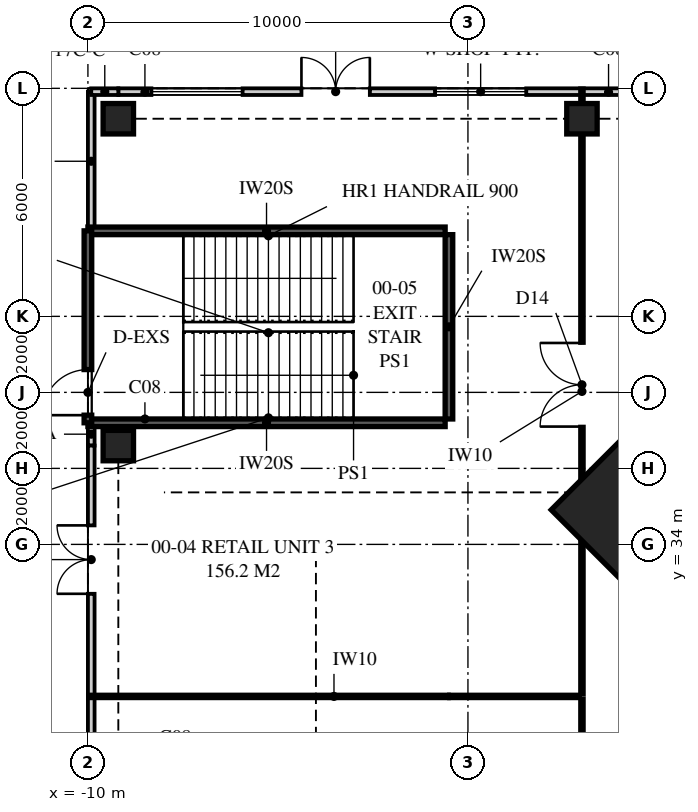
"""IFC4 building model, lengths in metres.
Left out: names, types, materials, properties, quantities, classifications, styles, units other than length and angle.
Written with IfcOpenShell. Run it as: python <this file> out.ifc"""

import sys

from ifc_helpers import new_model, si_unit, direction, frame, frame_2d, origin, origin_2d, place, context, subcontext, project, spatial, polyline, rectangle, outline, extrude, element, fill, save


model = new_model("IFC4")
c1 = context("Model", 3, precision=1e-05, world=origin(), true_north=direction((0.0, 1.0)))
c2 = subcontext(c1, "Body", "Model", "MODEL_VIEW")
j1 = project(units=[si_unit("LENGTHUNIT", "METRE"), si_unit("PLANEANGLEUNIT", "RADIAN")], contexts=[c1])
p1 = place(None, origin())
s1 = spatial("IfcSite", under=j1, at=p1, CompositionType="ELEMENT")
p2 = place(p1, origin())
s2 = spatial("IfcBuilding", under=s1, at=p2, CompositionType="ELEMENT")
p3 = place(p2, origin())
s3 = spatial("IfcBuildingStorey", under=s2, at=p3, CompositionType="ELEMENT", Elevation=0.0)
p4 = place(p3, frame((4.631, 35.369, 0.0), z_axis=(0.0, 0.0, 1.0), x_axis=(0.707106781187, -0.707106781187, 0.0)))
e1 = element("IfcColumn", 1, at=p4, inside=s3, PredefinedType="COLUMN", context=c2, shape_type="SweptSolid", body=[
    extrude(rectangle(XDim=2.8, YDim=4.1, at=origin_2d()), origin(), (0.0, 0.0, 1.0), 6.0),
])
for number, where, z_axis, x_axis in (
    (2, (-9.2, 36.6, 0.0), (0.0, 0.0, 1.0), (1.0, 0.0, 0.0)),
    (3, (-9.2, 45.2, 0.0), (0.0, 0.0, 1.0), (1.0, 0.0, 0.0)),
    (4, (3.0, 45.2, 0.0), (0.0, 0.0, 1.0), (1.0, 0.0, 0.0)),
):
    element("IfcColumn", number, at=place(p3, frame(where, z_axis=z_axis, x_axis=x_axis)), inside=s3, PredefinedType="COLUMN", context=c2, shape_type="SweptSolid", body=[
        extrude(rectangle(XDim=0.8, YDim=0.8, at=origin_2d()), origin(), (0.0, 0.0, 1.0), 6.0),
    ])
p5 = place(p3, frame((59.2, 45.913, 0.0), z_axis=(0.0, 0.0, 1.0), x_axis=(-1.0, 0.0, 0.0)))
e5 = element("IfcWall", 5, at=p5, inside=s3, PredefinedType="SOLIDWALL", context=c2, shape_type="SweptSolid", body=[
    extrude(rectangle(XDim=68.4, YDim=0.175, at=frame_2d((34.2, 0.0))), origin(), (0.0, 0.0, 1.0), 5.12),
])
p6 = place(p5, frame((0.6, 0.0, 0.0)))
e6 = element("IfcOpeningElement", 6, at=p6, cuts=e5, PredefinedType="OPENING", context=c2, shape_type="SweptSolid", body=[
    extrude(rectangle(XDim=3.6, YDim=4.8, at=frame_2d((1.8, 2.4))), frame((0.0, 0.097, 0.0), z_axis=(0.0, -1.0, 0.0), x_axis=(1.0, 0.0, 0.0)), (0.0, 0.0, 1.0), 0.195),
])
p7 = place(p5, frame((7.1, 0.0, 0.0)))
e7 = element("IfcOpeningElement", 7, at=p7, cuts=e5, PredefinedType="OPENING", context=c2, shape_type="SweptSolid", body=[
    extrude(rectangle(XDim=4.0, YDim=3.0, at=frame_2d((2.0, 1.5))), frame((0.0, 0.097, 0.0), z_axis=(0.0, -1.0, 0.0), x_axis=(1.0, 0.0, 0.0)), (0.0, 0.0, 1.0), 0.195),
])
p8 = place(p5, frame((30.9, 0.0, 0.0)))
e8 = element("IfcOpeningElement", 8, at=p8, cuts=e5, PredefinedType="OPENING", context=c2, shape_type="SweptSolid", body=[
    extrude(rectangle(XDim=4.0, YDim=4.5, at=frame_2d((2.0, 2.25))), frame((0.0, 0.097, 0.0), z_axis=(0.0, -1.0, 0.0), x_axis=(1.0, 0.0, 0.0)), (0.0, 0.0, 1.0), 0.195),
])
p9 = place(p5, frame((17.0, 0.0, 0.0)))
e9 = element("IfcOpeningElement", 9, at=p9, cuts=e5, PredefinedType="OPENING", context=c2, shape_type="SweptSolid", body=[
    extrude(rectangle(XDim=4.0, YDim=4.5, at=frame_2d((2.0, 2.25))), frame((0.0, 0.097, 0.0), z_axis=(0.0, -1.0, 0.0), x_axis=(1.0, 0.0, 0.0)), (0.0, 0.0, 1.0), 0.195),
])
p10 = place(p5, frame((36.45, 0.0, 0.0)))
e10 = element("IfcOpeningElement", 10, at=p10, cuts=e5, PredefinedType="OPENING", context=c2, shape_type="SweptSolid", body=[
    extrude(rectangle(XDim=1.0, YDim=2.2, at=frame_2d((0.5, 1.1))), frame((0.0, 0.097, 0.0), z_axis=(0.0, -1.0, 0.0), x_axis=(1.0, 0.0, 0.0)), (0.0, 0.0, 1.0), 0.195),
])
p11 = place(p5, frame((51.95, 0.0, 0.0)))
e11 = element("IfcOpeningElement", 11, at=p11, cuts=e5, PredefinedType="OPENING", context=c2, shape_type="SweptSolid", body=[
    extrude(rectangle(XDim=2.0, YDim=2.7, at=frame_2d((1.0, 1.35))), frame((0.0, 0.097, 0.0), z_axis=(0.0, -1.0, 0.0), x_axis=(1.0, 0.0, 0.0)), (0.0, 0.0, 1.0), 0.195),
])
p12 = place(p5, frame((61.781, 0.0, 0.0)))
e12 = element("IfcOpeningElement", 12, at=p12, cuts=e5, PredefinedType="OPENING", context=c2, shape_type="SweptSolid", body=[
    extrude(rectangle(XDim=1.8, YDim=2.7, at=frame_2d((0.9, 1.35))), frame((0.0, 0.097, 0.0), z_axis=(0.0, -1.0, 0.0), x_axis=(1.0, 0.0, 0.0)), (0.0, 0.0, 1.0), 0.195),
])
p13 = place(p5, frame((57.666, 0.0, 0.3)))
e13 = element("IfcOpeningElement", 13, at=p13, cuts=e5, PredefinedType="OPENING", context=c2, shape_type="SweptSolid", body=[
    extrude(rectangle(XDim=2.4, YDim=3.0, at=frame_2d((1.2, 1.5))), frame((0.0, 0.097, 0.0), z_axis=(0.0, -1.0, 0.0), x_axis=(1.0, 0.0, 0.0)), (0.0, 0.0, 1.0), 0.195),
])
p14 = place(p5, frame((65.129, 0.0, 0.3)))
e14 = element("IfcOpeningElement", 14, at=p14, cuts=e5, PredefinedType="OPENING", context=c2, shape_type="SweptSolid", body=[
    extrude(rectangle(XDim=2.4, YDim=3.0, at=frame_2d((1.2, 1.5))), frame((0.0, 0.097, 0.0), z_axis=(0.0, -1.0, 0.0), x_axis=(1.0, 0.0, 0.0)), (0.0, 0.0, 1.0), 0.195),
])
p15 = place(p3, frame((-9.2, 45.913, 0.0), z_axis=(0.0, 0.0, 1.0), x_axis=(-1.0, 0.0, 0.0)))
e15 = element("IfcWall", 15, at=p15, inside=s3, PredefinedType="SOLIDWALL", context=c2, shape_type="SweptSolid", body=[
    extrude(rectangle(XDim=0.713, YDim=0.175, at=frame_2d((0.356, 0.0))), origin(), (0.0, 0.0, 1.0), 5.72),
])
p16 = place(p3, frame((-10.0, 42.25, 0.0), z_axis=(0.0, 0.0, 1.0), x_axis=(0.0, -1.0, 0.0)))
e16 = element("IfcWall", 16, at=p16, inside=s3, PredefinedType="SOLIDWALL", context=c2, shape_type="SweptSolid", body=[
    extrude(rectangle(XDim=5.05, YDim=0.2, at=frame_2d((2.525, 0.0))), origin(), (0.0, 0.0, 1.0), 6.0),
])
p17 = place(p16, frame((3.65, 0.0, 0.0)))
e17 = element("IfcOpeningElement", 17, at=p17, cuts=e16, PredefinedType="OPENING", context=c2, shape_type="SweptSolid", body=[
    extrude(rectangle(XDim=1.2, YDim=2.1, at=frame_2d((0.6, 1.05))), frame((0.0, 0.11, 0.0), z_axis=(0.0, -1.0, 0.0), x_axis=(1.0, 0.0, 0.0)), (0.0, 0.0, 1.0), 0.22),
])
p18 = place(p3, frame((-9.913, 45.913, 0.0), z_axis=(0.0, 0.0, 1.0), x_axis=(0.0, -1.0, 0.0)))
e18 = element("IfcWall", 18, at=p18, inside=s3, PredefinedType="SOLIDWALL", context=c2, shape_type="SweptSolid", body=[
    extrude(rectangle(XDim=3.663, YDim=0.175, at=frame_2d((1.831, 0.0))), origin(), (0.0, 0.0, 1.0), 5.72),
])
p19 = place(p3, frame((-9.913, 37.2, 0.0), z_axis=(0.0, 0.0, 1.0), x_axis=(0.0, -1.0, 0.0)))
e19 = element("IfcWall", 19, at=p19, inside=s3, PredefinedType="SOLIDWALL", context=c2, shape_type="SweptSolid", body=[
    extrude(rectangle(XDim=0.6, YDim=0.175, at=frame_2d((0.3, 0.0))), origin(), (0.0, 0.0, 1.0), 5.72),
])
p20 = place(p3, frame((-9.913, 36.6, 0.0), z_axis=(0.0, 0.0, 1.0), x_axis=(0.0, -1.0, 0.0)))
e20 = element("IfcWall", 20, at=p20, inside=s3, PredefinedType="SOLIDWALL", context=c2, shape_type="SweptSolid", body=[
    extrude(rectangle(XDim=41.8, YDim=0.175, at=frame_2d((20.9, 0.0))), origin(), (0.0, 0.0, 1.0), 5.12),
])
p21 = place(p20, frame((2.1, 0.0, 0.0)))
e21 = element("IfcOpeningElement", 21, at=p21, cuts=e20, PredefinedType="OPENING", context=c2, shape_type="SweptSolid", body=[
    extrude(rectangle(XDim=1.8, YDim=2.7, at=frame_2d((0.9, 1.35))), frame((0.0, 0.097, 0.0), z_axis=(0.0, -1.0, 0.0), x_axis=(1.0, 0.0, 0.0)), (0.0, 0.0, 1.0), 0.195),
])
p22 = place(p20, frame((13.7, 0.0, 0.0)))
e22 = element("IfcOpeningElement", 22, at=p22, cuts=e20, PredefinedType="OPENING", context=c2, shape_type="SweptSolid", body=[
    extrude(rectangle(XDim=1.8, YDim=2.7, at=frame_2d((0.9, 1.35))), frame((0.0, 0.097, 0.0), z_axis=(0.0, -1.0, 0.0), x_axis=(1.0, 0.0, 0.0)), (0.0, 0.0, 1.0), 0.195),
])
p23 = place(p20, frame((9.294, 0.0, 0.3)))
e23 = element("IfcOpeningElement", 23, at=p23, cuts=e20, PredefinedType="OPENING", context=c2, shape_type="SweptSolid", body=[
    extrude(rectangle(XDim=2.4, YDim=3.0, at=frame_2d((1.2, 1.5))), frame((0.0, 0.097, 0.0), z_axis=(0.0, -1.0, 0.0), x_axis=(1.0, 0.0, 0.0)), (0.0, 0.0, 1.0), 0.195),
])
p24 = place(p20, frame((17.975, 0.0, 0.3)))
e24 = element("IfcOpeningElement", 24, at=p24, cuts=e20, PredefinedType="OPENING", context=c2, shape_type="SweptSolid", body=[
    extrude(rectangle(XDim=2.4, YDim=3.0, at=frame_2d((1.2, 1.5))), frame((0.0, 0.097, 0.0), z_axis=(0.0, -1.0, 0.0), x_axis=(1.0, 0.0, 0.0)), (0.0, 0.0, 1.0), 0.195),
])
p25 = place(p20, frame((26.716, 0.0, 0.0)))
e25 = element("IfcOpeningElement", 25, at=p25, cuts=e20, PredefinedType="OPENING", context=c2, shape_type="SweptSolid", body=[
    extrude(rectangle(XDim=1.8, YDim=2.7, at=frame_2d((0.9, 1.35))), frame((0.0, 0.097, 0.0), z_axis=(0.0, -1.0, 0.0), x_axis=(1.0, 0.0, 0.0)), (0.0, 0.0, 1.0), 0.195),
])
p26 = place(p20, frame((36.647, 0.0, 0.0)))
e26 = element("IfcOpeningElement", 26, at=p26, cuts=e20, PredefinedType="OPENING", context=c2, shape_type="SweptSolid", body=[
    extrude(rectangle(XDim=1.8, YDim=2.7, at=frame_2d((0.9, 1.35))), frame((0.0, 0.097, 0.0), z_axis=(0.0, -1.0, 0.0), x_axis=(1.0, 0.0, 0.0)), (0.0, 0.0, 1.0), 0.195),
])
p27 = place(p3, frame((3.0, 25.0, 0.0), z_axis=(0.0, 0.0, 1.0), x_axis=(0.0, 1.0, 0.0)))
e27 = element("IfcWall", 27, at=p27, inside=s3, PredefinedType="PARTITIONING", context=c2, shape_type="SweptSolid", body=[
    extrude(outline(polyline([(0.0, 0.0), (4.95, 0.0), (4.95, 5.72), (1.26, 5.72), (1.26, 5.12), (0.0, 5.12), (0.0, 0.0)])), frame((0.0, 0.05, 0.0), z_axis=(0.0, -1.0, 0.0), x_axis=(1.0, 0.0, 0.0)), (0.0, 0.0, 1.0), 0.1),
])
p28 = place(p3, frame((3.0, 30.05, 0.0), z_axis=(0.0, 0.0, 1.0), x_axis=(0.0, 1.0, 0.0)))
e28 = element("IfcWall", 28, at=p28, inside=s3, PredefinedType="PARTITIONING", context=c2, shape_type="SweptSolid", body=[
    extrude(outline(polyline([(0.0, 0.0), (15.95, 0.0), (15.95, 5.72), (15.95, 5.12), (13.89, 5.12), (13.89, 5.72), (6.579, 5.72), (6.579, 5.12), (4.059, 5.12), (4.059, 5.72), (0.0, 5.72), (0.0, 0.0)])), frame((0.0, 0.05, 0.0), z_axis=(0.0, -1.0, 0.0), x_axis=(1.0, 0.0, 0.0)), (0.0, 0.0, 1.0), 0.1),
])
p29 = place(p28, frame((7.05, 0.0, 0.0)))
e29 = element("IfcOpeningElement", 29, at=p29, cuts=e28, PredefinedType="OPENING", context=c2, shape_type="SweptSolid", body=[
    extrude(rectangle(XDim=2.2, YDim=2.7, at=frame_2d((1.1, 1.35))), frame((0.0, 0.06, 0.0), z_axis=(0.0, -1.0, 0.0), x_axis=(1.0, 0.0, 0.0)), (0.0, 0.0, 1.0), 0.12),
])
p30 = place(p3, frame((-0.5, 30.0, 0.0), z_axis=(0.0, 0.0, 1.0), x_axis=(1.0, 0.0, 0.0)))
e30 = element("IfcWall", 30, at=p30, inside=s3, PredefinedType="PARTITIONING", context=c2, shape_type="SweptSolid", body=[
    extrude(rectangle(XDim=3.45, YDim=0.1, at=frame_2d((1.725, 0.0))), origin(), (0.0, 0.0, 1.0), 5.72),
])
p31 = place(p3, frame((-10.0, 30.0, 0.0), z_axis=(0.0, 0.0, 1.0), x_axis=(1.0, 0.0, 0.0)))
e31 = element("IfcWall", 31, at=p31, inside=s3, PredefinedType="PARTITIONING", context=c2, shape_type="SweptSolid", body=[
    extrude(outline(polyline([(0.0, 0.0), (9.5, 0.0), (9.5, 5.72), (7.26, 5.72), (7.26, 5.12), (4.74, 5.12), (4.74, 5.72), (2.06, 5.72), (2.06, 5.12), (0.0, 5.12), (0.0, 5.72), (0.0, 0.0)])), frame((0.0, 0.05, 0.0), z_axis=(0.0, -1.0, 0.0), x_axis=(1.0, 0.0, 0.0)), (0.0, 0.0, 1.0), 0.1),
])
p32 = place(p3, frame((-0.5, 37.3, 0.0), z_axis=(0.0, 0.0, 1.0), x_axis=(0.0, 1.0, 0.0)))
e32 = element("IfcWall", 32, at=p32, inside=s3, PredefinedType="SOLIDWALL", context=c2, shape_type="SweptSolid", body=[
    extrude(rectangle(XDim=4.85, YDim=0.2, at=frame_2d((2.425, 0.0))), origin(), (0.0, 0.0, 1.0), 6.0),
])
for number, where, z_axis, x_axis in (
    (33, (-10.0, 37.2, 0.0), (0.0, 0.0, 1.0), (1.0, 0.0, 0.0)),
    (34, (-10.0, 42.25, 0.0), (0.0, 0.0, 1.0), (1.0, 0.0, 0.0)),
):
    element("IfcWall", number, at=place(p3, frame(where, z_axis=z_axis, x_axis=x_axis)), inside=s3, PredefinedType="SOLIDWALL", context=c2, shape_type="SweptSolid", body=[
        extrude(rectangle(XDim=9.4, YDim=0.2, at=frame_2d((4.7, 0.0))), origin(), (0.0, 0.0, 1.0), 6.0),
    ])
p33 = place(p12, frame((1.8, 0.0, 0.0), z_axis=(0.0, 0.0, 1.0), x_axis=(-1.0, 0.0, 0.0)))
e35 = element("IfcDoor", 35, at=p33, inside=s3, OperationType="DOUBLE_DOOR_SINGLE_SWING", PredefinedType="DOOR", context=c2, shape_type="SweptSolid", body=[
    extrude(rectangle(XDim=1.8, YDim=2.7, at=frame_2d((0.9, 1.35))), frame((0.0, 0.025, 0.0), z_axis=(0.0, -1.0, 0.0), x_axis=(1.0, 0.0, 0.0)), (0.0, 0.0, 1.0), 0.05),
])
fill(e12, e35)
p34 = place(p13, origin())
e36 = element("IfcWindow", 36, at=p34, inside=s3, PartitioningType="SINGLE_PANEL", PredefinedType="WINDOW", context=c2, shape_type="SweptSolid", body=[
    extrude(rectangle(XDim=2.4, YDim=3.0, at=frame_2d((1.2, 1.5))), frame((0.0, 0.03, 0.0), z_axis=(0.0, -1.0, 0.0), x_axis=(1.0, 0.0, 0.0)), (0.0, 0.0, 1.0), 0.06),
])
fill(e13, e36)
p35 = place(p14, origin())
e37 = element("IfcWindow", 37, at=p35, inside=s3, PartitioningType="SINGLE_PANEL", PredefinedType="WINDOW", context=c2, shape_type="SweptSolid", body=[
    extrude(rectangle(XDim=2.4, YDim=3.0, at=frame_2d((1.2, 1.5))), frame((0.0, 0.03, 0.0), z_axis=(0.0, -1.0, 0.0), x_axis=(1.0, 0.0, 0.0)), (0.0, 0.0, 1.0), 0.06),
])
fill(e14, e37)
p36 = place(p17, frame((1.2, 0.0, 0.0), z_axis=(0.0, 0.0, 1.0), x_axis=(-1.0, 0.0, 0.0)))
e38 = element("IfcDoor", 38, at=p36, inside=s3, OperationType="SINGLE_SWING_LEFT", PredefinedType="DOOR", context=c2, shape_type="SweptSolid", body=[
    extrude(rectangle(XDim=1.2, YDim=2.1, at=frame_2d((0.6, 1.05))), frame((0.0, 0.025, 0.0), z_axis=(0.0, -1.0, 0.0), x_axis=(1.0, 0.0, 0.0)), (0.0, 0.0, 1.0), 0.05),
])
fill(e17, e38)
p37 = place(p21, frame((1.8, 0.0, 0.0), z_axis=(0.0, 0.0, 1.0), x_axis=(-1.0, 0.0, 0.0)))
e39 = element("IfcDoor", 39, at=p37, inside=s3, OperationType="DOUBLE_DOOR_SINGLE_SWING", PredefinedType="DOOR", context=c2, shape_type="SweptSolid", body=[
    extrude(rectangle(XDim=1.8, YDim=2.7, at=frame_2d((0.9, 1.35))), frame((0.0, 0.025, 0.0), z_axis=(0.0, -1.0, 0.0), x_axis=(1.0, 0.0, 0.0)), (0.0, 0.0, 1.0), 0.05),
])
fill(e21, e39)
p38 = place(p29, origin())
e40 = element("IfcDoor", 40, at=p38, inside=s3, OperationType="DOUBLE_DOOR_SINGLE_SWING", PredefinedType="DOOR", context=c2, shape_type="SweptSolid", body=[
    extrude(rectangle(XDim=2.2, YDim=2.7, at=frame_2d((1.1, 1.35))), frame((0.0, 0.025, 0.0), z_axis=(0.0, -1.0, 0.0), x_axis=(1.0, 0.0, 0.0)), (0.0, 0.0, 1.0), 0.05),
])
fill(e29, e40)
save(model, sys.argv[1])
